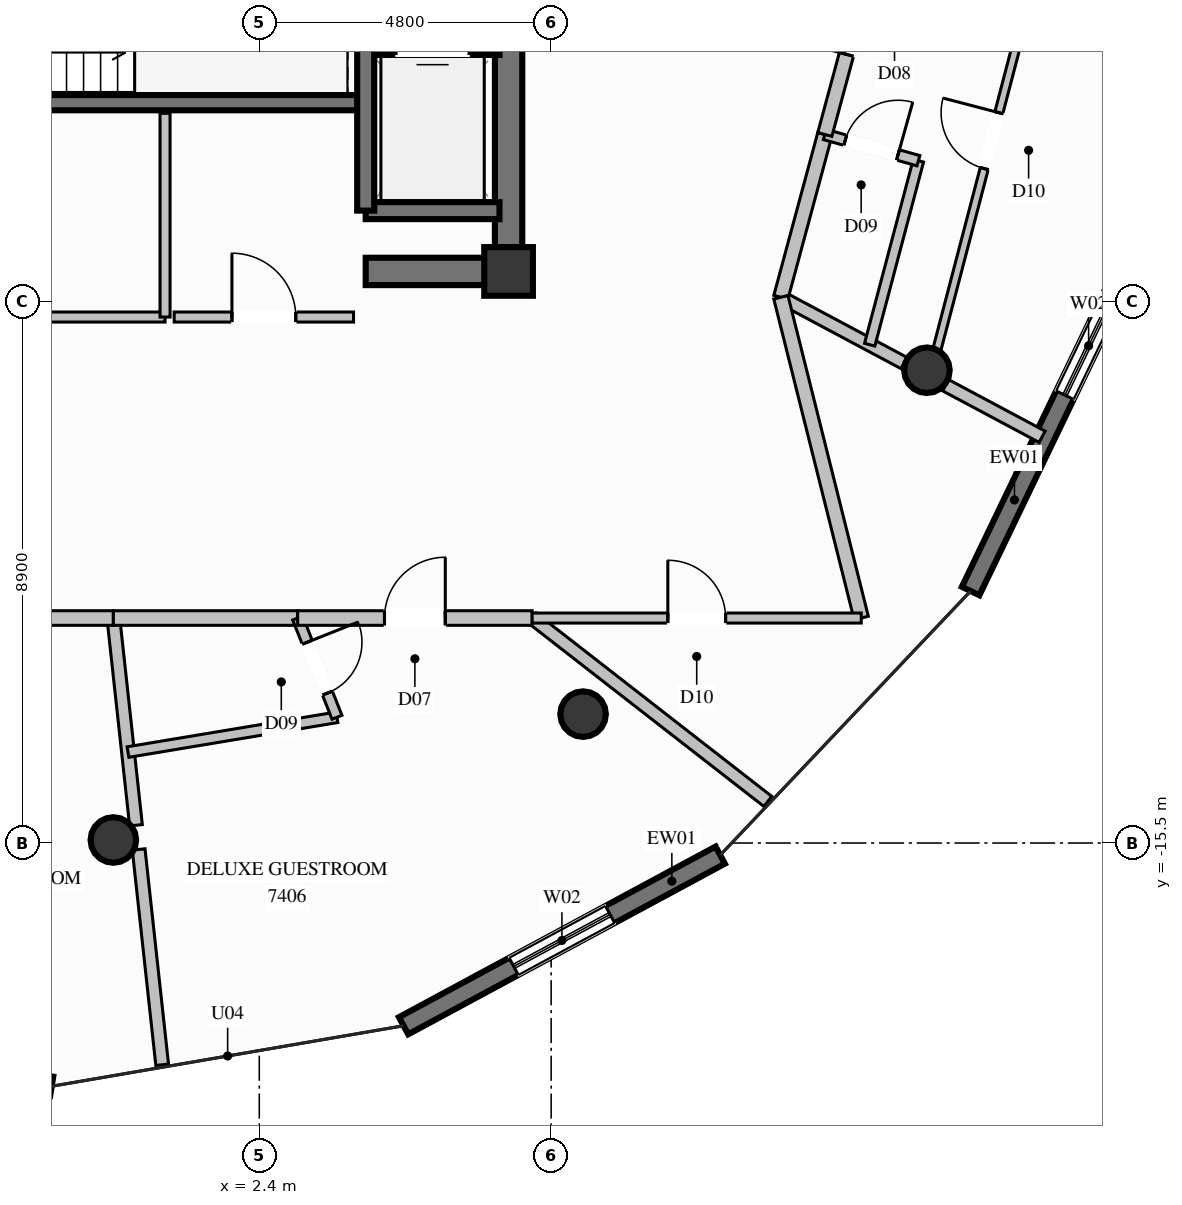
"""IFC4 building model, lengths in metres.
Left out: names, types, materials, properties, quantities, classifications, styles, units other than length and angle.
Written with IfcOpenShell. Run it as: python <this file> out.ifc"""

import sys

from ifc_helpers import new_model, si_unit, direction, frame, frame_2d, origin, origin_2d, place, context, subcontext, project, spatial, rectangle, circle, extrude, element, fill, save


model = new_model("IFC4")
c1 = context("Model", 3, precision=1e-05, world=origin(), true_north=direction((0.0, 1.0)))
c2 = subcontext(c1, "Body", "Model", "MODEL_VIEW")
j1 = project(units=[si_unit("LENGTHUNIT", "METRE"), si_unit("PLANEANGLEUNIT", "RADIAN")], contexts=[c1])
p1 = place(None, origin())
s1 = spatial("IfcSite", under=j1, at=p1, CompositionType="ELEMENT")
p2 = place(p1, origin())
s2 = spatial("IfcBuilding", under=s1, at=p2, CompositionType="ELEMENT")
p3 = place(p2, frame((0.0, 0.0, 278.2)))
s3 = spatial("IfcBuildingStorey", under=s2, at=p3, CompositionType="ELEMENT", Elevation=278.2)
p4 = place(p3, frame((6.5, -6.1, 0.0), z_axis=(0.0, 0.0, 1.0), x_axis=(1.0, 0.0, 0.0)))
e1 = element("IfcColumn", 1, at=p4, inside=s3, PredefinedType="COLUMN", context=c2, shape_type="SweptSolid", body=[
    extrude(rectangle(XDim=0.8, YDim=0.8, at=origin_2d()), origin(), (0.0, 0.0, 1.0), 3.8),
])
p5 = place(p3, frame((-4.13, -3.325, 0.0), z_axis=(0.0, 0.0, 1.0), x_axis=(1.0, 0.0, 0.0)))
e2 = element("IfcWall", 2, at=p5, inside=s3, PredefinedType="SOLIDWALL", context=c2, shape_type="SweptSolid", body=[
    extrude(rectangle(XDim=8.26, YDim=0.25, at=frame_2d((4.13, 0.0))), origin(), (0.0, 0.0, 1.0), 3.8),
])
p6 = place(p3, frame((4.15, -6.1, 0.0), z_axis=(0.0, 0.0, 1.0), x_axis=(1.0, 0.0, 0.0)))
e3 = element("IfcWall", 3, at=p6, inside=s3, PredefinedType="SHEAR", context=c2, shape_type="SweptSolid", body=[
    extrude(rectangle(XDim=2.125, YDim=0.45, at=frame_2d((1.062, 0.0))), origin(), (0.0, 0.0, 1.0), 3.8),
])
p7 = place(p3, frame((6.5, -6.325, 0.0), z_axis=(0.0, 0.0, 1.0), x_axis=(0.0, 1.0, 0.0)))
e4 = element("IfcWall", 4, at=p7, inside=s3, PredefinedType="SHEAR", context=c2, shape_type="SweptSolid", body=[
    extrude(rectangle(XDim=3.975, YDim=0.45, at=frame_2d((1.987, 0.0))), origin(), (0.0, 0.0, 1.0), 3.8),
])
for number, where, z_axis, x_axis in (
    (5, (0.0, -15.45, 0.0), (0.0, 0.0, 1.0), (1.0, 0.0, 0.0)),
    (6, (7.725, -13.38, 0.0), (0.0, 0.0, 1.0), (1.0, 0.0, 0.0)),
    (7, (13.38, -7.725, 0.0), (0.0, 0.0, 1.0), (1.0, 0.0, 0.0)),
):
    element("IfcColumn", number, at=place(p3, frame(where, z_axis=z_axis, x_axis=x_axis)), inside=s3, PredefinedType="COLUMN", context=c2, shape_type="SweptSolid", body=[
        extrude(circle(Radius=0.375, at=origin_2d()), origin(), (0.0, 0.0, 1.0), 3.8),
    ])
p8 = place(p3, frame((9.981, -15.699, 0.0), z_axis=(0.0, 0.0, 1.0), x_axis=(-0.880358436165, -0.474308996196, 0.0)))
e8 = element("IfcWall", 8, at=p8, inside=s3, PredefinedType="SOLIDWALL", context=c2, shape_type="SweptSolid", body=[
    extrude(rectangle(XDim=5.916, YDim=0.32, at=frame_2d((2.958, 0.0))), origin(), (0.0, 0.0, 1.0), 3.57),
])
p9 = place(p8, frame((2.058, 0.0, 0.35)))
e9 = element("IfcOpeningElement", 9, at=p9, cuts=e8, PredefinedType="OPENING", context=c2, shape_type="SweptSolid", body=[
    extrude(rectangle(XDim=1.8, YDim=2.6, at=frame_2d((0.9, 1.3))), frame((0.0, 0.17, 0.0), z_axis=(0.0, -1.0, 0.0), x_axis=(1.0, 0.0, 0.0)), (0.0, 0.0, 1.0), 0.34),
])
p10 = place(p3, frame((16.724, -5.901, 0.0), z_axis=(0.0, 0.0, 1.0), x_axis=(-0.433611899422, -0.901099728487, 0.0)))
e10 = element("IfcWall", 10, at=p10, inside=s3, PredefinedType="SOLIDWALL", context=c2, shape_type="SweptSolid", body=[
    extrude(rectangle(XDim=6.054, YDim=0.32, at=frame_2d((3.027, 0.0))), origin(), (0.0, 0.0, 1.0), 3.57),
])
p11 = place(p10, frame((0.679, 0.0, 0.35)))
e11 = element("IfcOpeningElement", 11, at=p11, cuts=e10, PredefinedType="OPENING", context=c2, shape_type="SweptSolid", body=[
    extrude(rectangle(XDim=1.8, YDim=2.6, at=frame_2d((0.9, 1.3))), frame((0.0, 0.17, 0.0), z_axis=(0.0, -1.0, 0.0), x_axis=(1.0, 0.0, 0.0)), (0.0, 0.0, 1.0), 0.34),
])
p12 = place(p3, frame((-1.014, -19.5, 0.0), z_axis=(0.0, 0.0, 1.0), x_axis=(-0.987808436163, 0.155674318516, 0.0)))
e12 = element("IfcWall", 12, at=p12, inside=s3, PredefinedType="SOLIDWALL", context=c2, shape_type="SweptSolid", body=[
    extrude(rectangle(XDim=5.872, YDim=0.32, at=frame_2d((2.936, 0.0))), origin(), (0.0, 0.0, 1.0), 3.57),
])
p13 = place(p12, frame((2.036, 0.0, 0.35)))
e13 = element("IfcOpeningElement", 13, at=p13, cuts=e12, PredefinedType="OPENING", context=c2, shape_type="SweptSolid", body=[
    extrude(rectangle(XDim=1.8, YDim=2.6, at=frame_2d((0.9, 1.3))), frame((0.0, 0.17, 0.0), z_axis=(0.0, -1.0, 0.0), x_axis=(1.0, 0.0, 0.0)), (0.0, 0.0, 1.0), 0.34),
])
p14 = place(p3, frame((4.15, -5.1, 0.0), z_axis=(0.0, 0.0, 1.0), x_axis=(1.0, 0.0, 0.0)))
e14 = element("IfcWall", 14, at=p14, inside=s3, PredefinedType="SOLIDWALL", context=c2, shape_type="SweptSolid", body=[
    extrude(rectangle(XDim=2.2, YDim=0.28, at=frame_2d((1.1, 0.0))), origin(), (0.0, 0.0, 1.0), 3.57),
])
p15 = place(p3, frame((6.35, -2.4, 0.0), z_axis=(0.0, 0.0, 1.0), x_axis=(-1.0, 0.0, 0.0)))
e15 = element("IfcWall", 15, at=p15, inside=s3, PredefinedType="SOLIDWALL", context=c2, shape_type="SweptSolid", body=[
    extrude(rectangle(XDim=2.2, YDim=0.28, at=frame_2d((1.1, 0.0))), origin(), (0.0, 0.0, 1.0), 3.57),
])
p16 = place(p15, frame((0.5, 0.0, 0.0)))
e16 = element("IfcOpeningElement", 16, at=p16, cuts=e15, PredefinedType="OPENING", context=c2, shape_type="SweptSolid", body=[
    extrude(rectangle(XDim=1.2, YDim=2.2, at=frame_2d((0.6, 1.1))), frame((0.0, 0.15, 0.0), z_axis=(0.0, -1.0, 0.0), x_axis=(1.0, 0.0, 0.0)), (0.0, 0.0, 1.0), 0.3),
])
p17 = place(p3, frame((4.15, -2.4, 0.0), z_axis=(0.0, 0.0, 1.0), x_axis=(0.0, -1.0, 0.0)))
e17 = element("IfcWall", 17, at=p17, inside=s3, PredefinedType="SOLIDWALL", context=c2, shape_type="SweptSolid", body=[
    extrude(rectangle(XDim=2.7, YDim=0.28, at=frame_2d((1.35, 0.0))), origin(), (0.0, 0.0, 1.0), 3.57),
])
p18 = place(p3, frame((-5.7, -6.85, 0.0), z_axis=(0.0, 0.0, 1.0), x_axis=(1.0, 0.0, 0.0)))
e18 = element("IfcWall", 18, at=p18, inside=s3, PredefinedType="PARTITIONING", context=c2, shape_type="SweptSolid", body=[
    extrude(rectangle(XDim=6.55, YDim=0.165, at=frame_2d((3.275, 0.0))), origin(), (0.0, 0.0, 1.0), 2.655),
])
p19 = place(p18, frame((2.8, 0.0, 0.0)))
e19 = element("IfcOpeningElement", 19, at=p19, cuts=e18, PredefinedType="OPENING", context=c2, shape_type="SweptSolid", body=[
    extrude(rectangle(XDim=0.95, YDim=2.1, at=frame_2d((0.475, 1.05))), frame((0.0, 0.093, 0.0), z_axis=(0.0, -1.0, 0.0), x_axis=(1.0, 0.0, 0.0)), (0.0, 0.0, 1.0), 0.185),
])
p20 = place(p3, frame((0.85, -6.85, 0.0), z_axis=(0.0, 0.0, 1.0), x_axis=(0.0, 1.0, 0.0)))
e20 = element("IfcWall", 20, at=p20, inside=s3, PredefinedType="PARTITIONING", context=c2, shape_type="SweptSolid", body=[
    extrude(rectangle(XDim=3.35, YDim=0.165, at=frame_2d((1.675, 0.0))), origin(), (0.0, 0.0, 1.0), 3.57),
])
p21 = place(p3, frame((1.0, -6.85, 0.0), z_axis=(0.0, 0.0, 1.0), x_axis=(1.0, 0.0, 0.0)))
e21 = element("IfcWall", 21, at=p21, inside=s3, PredefinedType="PARTITIONING", context=c2, shape_type="SweptSolid", body=[
    extrude(rectangle(XDim=2.95, YDim=0.165, at=frame_2d((1.475, 0.0))), origin(), (0.0, 0.0, 1.0), 2.655),
])
p22 = place(p21, frame((0.95, 0.0, 0.0)))
e22 = element("IfcOpeningElement", 22, at=p22, cuts=e21, PredefinedType="OPENING", context=c2, shape_type="SweptSolid", body=[
    extrude(rectangle(XDim=1.05, YDim=2.15, at=frame_2d((0.525, 1.075))), frame((0.0, 0.093, 0.0), z_axis=(0.0, -1.0, 0.0), x_axis=(1.0, 0.0, 0.0)), (0.0, 0.0, 1.0), 0.185),
])
p23 = place(p3, frame((10.978, -6.525, 0.0), z_axis=(0.0, 0.0, 1.0), x_axis=(0.882152653626, -0.470963582138, 0.0)))
e23 = element("IfcWall", 23, at=p23, inside=s3, PredefinedType="PARTITIONING", context=c2, shape_type="SweptSolid", body=[
    extrude(rectangle(XDim=2.295, YDim=0.21, at=frame_2d((1.148, 0.0))), origin(), (0.0, 0.0, 1.0), 3.011),
])
p24 = place(p3, frame((13.688, -7.972, 0.0), z_axis=(0.0, 0.0, 1.0), x_axis=(0.882165026319, -0.470940406358, 0.0)))
e24 = element("IfcWall", 24, at=p24, inside=s3, PredefinedType="PARTITIONING", context=c2, shape_type="SweptSolid", body=[
    extrude(rectangle(XDim=1.799, YDim=0.21, at=frame_2d((0.899, 0.0))), origin(), (0.0, 0.0, 1.0), 3.57),
])
p25 = place(p3, frame((10.978, -6.525, 0.0), z_axis=(0.0, 0.0, 1.0), x_axis=(0.260702780503, 0.965419111183, 0.0)))
e25 = element("IfcWall", 25, at=p25, inside=s3, PredefinedType="PARTITIONING", context=c2, shape_type="SweptSolid", body=[
    extrude(rectangle(XDim=2.773, YDim=0.24, at=frame_2d((1.386, 0.0))), origin(), (0.0, 0.0, 1.0), 3.57),
])
p26 = place(p3, frame((12.439, -7.305, 0.0), z_axis=(0.0, 0.0, 1.0), x_axis=(0.255909710893, 0.96670068784, 0.0)))
e26 = element("IfcWall", 26, at=p26, inside=s3, PredefinedType="PLUMBINGWALL", context=c2, shape_type="SweptSolid", body=[
    extrude(rectangle(XDim=3.13, YDim=0.175, at=frame_2d((1.565, 0.0))), origin(), (0.0, 0.0, 1.0), 3.57),
])
p27 = place(p3, frame((11.701, -3.848, 0.0), z_axis=(0.0, 0.0, 1.0), x_axis=(0.962929110561, -0.269754569995, 0.0)))
e27 = element("IfcWall", 27, at=p27, inside=s3, PredefinedType="PLUMBINGWALL", context=c2, shape_type="SweptSolid", body=[
    extrude(rectangle(XDim=1.598, YDim=0.175, at=frame_2d((0.799, 0.0))), origin(), (0.0, 0.0, 1.0), 3.57),
])
p28 = place(p27, frame((0.349, 0.0, 0.0)))
e28 = element("IfcOpeningElement", 28, at=p28, cuts=e27, PredefinedType="OPENING", context=c2, shape_type="SweptSolid", body=[
    extrude(rectangle(XDim=0.9, YDim=2.1, at=frame_2d((0.45, 1.05))), frame((0.0, 0.098, 0.0), z_axis=(0.0, -1.0, 0.0), x_axis=(1.0, 0.0, 0.0)), (0.0, 0.0, 1.0), 0.195),
])
p29 = place(p3, frame((11.701, -3.848, 0.0), z_axis=(0.0, 0.0, 1.0), x_axis=(0.260803073576, 0.965392022348, 0.0)))
e29 = element("IfcWall", 29, at=p29, inside=s3, PredefinedType="PARTITIONING", context=c2, shape_type="SweptSolid", body=[
    extrude(rectangle(XDim=3.831, YDim=0.24, at=frame_2d((1.915, 0.0))), origin(), (0.0, 0.0, 1.0), 3.57),
])
p30 = place(p29, frame((1.365, 0.0, 0.0)))
e30 = element("IfcOpeningElement", 30, at=p30, cuts=e29, PredefinedType="OPENING", context=c2, shape_type="SweptSolid", body=[
    extrude(rectangle(XDim=1.1, YDim=2.3, at=frame_2d((0.55, 1.15))), frame((0.0, 0.13, 0.0), z_axis=(0.0, -1.0, 0.0), x_axis=(1.0, 0.0, 0.0)), (0.0, 0.0, 1.0), 0.26),
])
p31 = place(p3, frame((13.427, -7.833, 0.0), z_axis=(0.0, 0.0, 1.0), x_axis=(0.253066711185, 0.967448830528, 0.0)))
e31 = element("IfcWall", 31, at=p31, inside=s3, PredefinedType="PARTITIONING", context=c2, shape_type="SweptSolid", body=[
    extrude(rectangle(XDim=8.03, YDim=0.135, at=frame_2d((4.015, 0.0))), origin(), (0.0, 0.0, 1.0), 3.137),
])
p32 = place(p31, frame((3.54, 0.0, 0.0)))
e32 = element("IfcOpeningElement", 32, at=p32, cuts=e31, PredefinedType="OPENING", context=c2, shape_type="SweptSolid", body=[
    extrude(rectangle(XDim=0.95, YDim=2.1, at=frame_2d((0.475, 1.05))), frame((0.0, 0.078, 0.0), z_axis=(0.0, -1.0, 0.0), x_axis=(1.0, 0.0, 0.0)), (0.0, 0.0, 1.0), 0.155),
])
p33 = place(p3, frame((0.0, -11.8, 0.0), z_axis=(0.0, 0.0, 1.0), x_axis=(0.10853196296, -0.994092959947, 0.0)))
e33 = element("IfcWall", 33, at=p33, inside=s3, PredefinedType="PARTITIONING", context=c2, shape_type="SweptSolid", body=[
    extrude(rectangle(XDim=3.428, YDim=0.21, at=frame_2d((1.714, 0.0))), origin(), (0.0, 0.0, 1.0), 3.57),
])
p34 = place(p3, frame((0.416, -15.606, 0.0), z_axis=(0.0, 0.0, 1.0), x_axis=(0.108633464481, -0.994081873084, 0.0)))
e34 = element("IfcWall", 34, at=p34, inside=s3, PredefinedType="PARTITIONING", context=c2, shape_type="SweptSolid", body=[
    extrude(rectangle(XDim=3.562, YDim=0.21, at=frame_2d((1.781, 0.0))), origin(), (0.0, 0.0, 1.0), 3.57),
])
p35 = place(p3, frame((-3.857, -11.8, 0.0), z_axis=(0.0, 0.0, 1.0), x_axis=(1.0, 0.0, 0.0)))
e35 = element("IfcWall", 35, at=p35, inside=s3, PredefinedType="PARTITIONING", context=c2, shape_type="SweptSolid", body=[
    extrude(rectangle(XDim=3.857, YDim=0.24, at=frame_2d((1.928, 0.0))), origin(), (0.0, 0.0, 1.0), 3.57),
])
p36 = place(p35, frame((1.429, 0.0, 0.0)))
e36 = element("IfcOpeningElement", 36, at=p36, cuts=e35, PredefinedType="OPENING", context=c2, shape_type="SweptSolid", body=[
    extrude(rectangle(XDim=1.0, YDim=2.2, at=frame_2d((0.5, 1.1))), frame((0.0, 0.13, 0.0), z_axis=(0.0, -1.0, 0.0), x_axis=(1.0, 0.0, 0.0)), (0.0, 0.0, 1.0), 0.26),
])
p37 = place(p3, frame((0.0, -11.8, 0.0), z_axis=(0.0, 0.0, 1.0), x_axis=(1.0, 0.0, 0.0)))
e37 = element("IfcWall", 37, at=p37, inside=s3, PredefinedType="PARTITIONING", context=c2, shape_type="SweptSolid", body=[
    extrude(rectangle(XDim=3.031, YDim=0.24, at=frame_2d((1.516, 0.0))), origin(), (0.0, 0.0, 1.0), 3.57),
])
p38 = place(p3, frame((0.241, -14.004, 0.0), z_axis=(0.0, 0.0, 1.0), x_axis=(0.986431772805, 0.164171732042, 0.0)))
e38 = element("IfcWall", 38, at=p38, inside=s3, PredefinedType="PLUMBINGWALL", context=c2, shape_type="SweptSolid", body=[
    extrude(rectangle(XDim=3.484, YDim=0.175, at=frame_2d((1.742, 0.0))), origin(), (0.0, 0.0, 1.0), 3.57),
])
p39 = place(p3, frame((3.031, -11.8, 0.0), z_axis=(0.0, 0.0, 1.0), x_axis=(0.368559412983, -0.92960419486, 0.0)))
e39 = element("IfcWall", 39, at=p39, inside=s3, PredefinedType="PLUMBINGWALL", context=c2, shape_type="SweptSolid", body=[
    extrude(rectangle(XDim=1.755, YDim=0.175, at=frame_2d((0.878, 0.0))), origin(), (0.0, 0.0, 1.0), 3.57),
])
p40 = place(p39, frame((0.428, 0.0, 0.0)))
e40 = element("IfcOpeningElement", 40, at=p40, cuts=e39, PredefinedType="OPENING", context=c2, shape_type="SweptSolid", body=[
    extrude(rectangle(XDim=0.9, YDim=2.1, at=frame_2d((0.45, 1.05))), frame((0.0, 0.098, 0.0), z_axis=(0.0, -1.0, 0.0), x_axis=(1.0, 0.0, 0.0)), (0.0, 0.0, 1.0), 0.195),
])
p41 = place(p3, frame((6.888, -11.8, 0.0), z_axis=(0.0, 0.0, 1.0), x_axis=(0.789231745567, -0.614095474489, 0.0)))
e41 = element("IfcWall", 41, at=p41, inside=s3, PredefinedType="PARTITIONING", context=c2, shape_type="SweptSolid", body=[
    extrude(rectangle(XDim=4.911, YDim=0.21, at=frame_2d((2.456, 0.0))), origin(), (0.0, 0.0, 1.0), 3.57),
])
p42 = place(p3, frame((3.031, -11.8, 0.0), z_axis=(0.0, 0.0, 1.0), x_axis=(1.0, 0.0, 0.0)))
e42 = element("IfcWall", 42, at=p42, inside=s3, PredefinedType="PARTITIONING", context=c2, shape_type="SweptSolid", body=[
    extrude(rectangle(XDim=3.857, YDim=0.24, at=frame_2d((1.928, 0.0))), origin(), (0.0, 0.0, 1.0), 3.57),
])
p43 = place(p42, frame((1.428, 0.0, 0.0)))
e43 = element("IfcOpeningElement", 43, at=p43, cuts=e42, PredefinedType="OPENING", context=c2, shape_type="SweptSolid", body=[
    extrude(rectangle(XDim=1.0, YDim=2.2, at=frame_2d((0.5, 1.1))), frame((0.0, 0.13, 0.0), z_axis=(0.0, -1.0, 0.0), x_axis=(1.0, 0.0, 0.0)), (0.0, 0.0, 1.0), 0.26),
])
p44 = place(p3, frame((12.3, -11.8, 0.0), z_axis=(0.0, 0.0, 1.0), x_axis=(-0.243095426382, 0.970002378179, 0.0)))
e44 = element("IfcWall", 44, at=p44, inside=s3, PredefinedType="PARTITIONING", context=c2, shape_type="SweptSolid", body=[
    extrude(rectangle(XDim=5.438, YDim=0.24, at=frame_2d((2.719, 0.0))), origin(), (0.0, 0.0, 1.0), 3.57),
])
p45 = place(p3, frame((6.888, -11.8, 0.0), z_axis=(0.0, 0.0, 1.0), x_axis=(1.0, 0.0, 0.0)))
e45 = element("IfcWall", 45, at=p45, inside=s3, PredefinedType="PARTITIONING", context=c2, shape_type="SweptSolid", body=[
    extrude(rectangle(XDim=5.412, YDim=0.165, at=frame_2d((2.706, 0.0))), origin(), (0.0, 0.0, 1.0), 3.57),
])
p46 = place(p45, frame((2.231, 0.0, 0.0)))
e46 = element("IfcOpeningElement", 46, at=p46, cuts=e45, PredefinedType="OPENING", context=c2, shape_type="SweptSolid", body=[
    extrude(rectangle(XDim=0.95, YDim=2.1, at=frame_2d((0.475, 1.05))), frame((0.0, 0.093, 0.0), z_axis=(0.0, -1.0, 0.0), x_axis=(1.0, 0.0, 0.0)), (0.0, 0.0, 1.0), 0.185),
])
p47 = place(p9, origin())
e47 = element("IfcWindow", 47, at=p47, inside=s3, PartitioningType="SINGLE_PANEL", PredefinedType="WINDOW", context=c2, shape_type="SweptSolid", body=[
    extrude(rectangle(XDim=1.8, YDim=2.6, at=frame_2d((0.9, 1.3))), frame((0.0, 0.03, 0.0), z_axis=(0.0, -1.0, 0.0), x_axis=(1.0, 0.0, 0.0)), (0.0, 0.0, 1.0), 0.06),
])
fill(e9, e47)
p48 = place(p11, origin())
e48 = element("IfcWindow", 48, at=p48, inside=s3, PartitioningType="SINGLE_PANEL", PredefinedType="WINDOW", context=c2, shape_type="SweptSolid", body=[
    extrude(rectangle(XDim=1.8, YDim=2.6, at=frame_2d((0.9, 1.3))), frame((0.0, 0.03, 0.0), z_axis=(0.0, -1.0, 0.0), x_axis=(1.0, 0.0, 0.0)), (0.0, 0.0, 1.0), 0.06),
])
fill(e11, e48)
p49 = place(p22, origin())
e49 = element("IfcDoor", 49, at=p49, inside=s3, OperationType="SINGLE_SWING_LEFT", PredefinedType="DOOR", context=c2, shape_type="SweptSolid", body=[
    extrude(rectangle(XDim=1.05, YDim=2.15, at=frame_2d((0.525, 1.075))), frame((0.0, 0.025, 0.0), z_axis=(0.0, -1.0, 0.0), x_axis=(1.0, 0.0, 0.0)), (0.0, 0.0, 1.0), 0.05),
])
fill(e22, e49)
p50 = place(p28, origin())
e50 = element("IfcDoor", 50, at=p50, inside=s3, OperationType="SINGLE_SWING_RIGHT", PredefinedType="DOOR", context=c2, shape_type="SweptSolid", body=[
    extrude(rectangle(XDim=0.9, YDim=2.1, at=frame_2d((0.45, 1.05))), frame((0.0, 0.025, 0.0), z_axis=(0.0, -1.0, 0.0), x_axis=(1.0, 0.0, 0.0)), (0.0, 0.0, 1.0), 0.05),
])
fill(e28, e50)
p51 = place(p30, origin())
e51 = element("IfcDoor", 51, at=p51, inside=s3, OperationType="SINGLE_SWING_LEFT", PredefinedType="DOOR", context=c2, shape_type="SweptSolid", body=[
    extrude(rectangle(XDim=1.1, YDim=2.3, at=frame_2d((0.55, 1.15))), frame((0.0, 0.025, 0.0), z_axis=(0.0, -1.0, 0.0), x_axis=(1.0, 0.0, 0.0)), (0.0, 0.0, 1.0), 0.05),
])
fill(e30, e51)
p52 = place(p32, origin())
e52 = element("IfcDoor", 52, at=p52, inside=s3, OperationType="SINGLE_SWING_RIGHT", PredefinedType="DOOR", context=c2, shape_type="SweptSolid", body=[
    extrude(rectangle(XDim=0.95, YDim=2.1, at=frame_2d((0.475, 1.05))), frame((0.0, 0.025, 0.0), z_axis=(0.0, -1.0, 0.0), x_axis=(1.0, 0.0, 0.0)), (0.0, 0.0, 1.0), 0.05),
])
fill(e32, e52)
p53 = place(p40, origin())
e53 = element("IfcDoor", 53, at=p53, inside=s3, OperationType="SINGLE_SWING_LEFT", PredefinedType="DOOR", context=c2, shape_type="SweptSolid", body=[
    extrude(rectangle(XDim=0.9, YDim=2.1, at=frame_2d((0.45, 1.05))), frame((0.0, 0.025, 0.0), z_axis=(0.0, -1.0, 0.0), x_axis=(1.0, 0.0, 0.0)), (0.0, 0.0, 1.0), 0.05),
])
fill(e40, e53)
p54 = place(p43, origin())
e54 = element("IfcDoor", 54, at=p54, inside=s3, OperationType="SINGLE_SWING_RIGHT", PredefinedType="DOOR", context=c2, shape_type="SweptSolid", body=[
    extrude(rectangle(XDim=1.0, YDim=2.2, at=frame_2d((0.5, 1.1))), frame((0.0, 0.025, 0.0), z_axis=(0.0, -1.0, 0.0), x_axis=(1.0, 0.0, 0.0)), (0.0, 0.0, 1.0), 0.05),
])
fill(e43, e54)
p55 = place(p46, origin())
e55 = element("IfcDoor", 55, at=p55, inside=s3, OperationType="SINGLE_SWING_LEFT", PredefinedType="DOOR", context=c2, shape_type="SweptSolid", body=[
    extrude(rectangle(XDim=0.95, YDim=2.1, at=frame_2d((0.475, 1.05))), frame((0.0, 0.025, 0.0), z_axis=(0.0, -1.0, 0.0), x_axis=(1.0, 0.0, 0.0)), (0.0, 0.0, 1.0), 0.05),
])
fill(e46, e55)
save(model, sys.argv[1])
